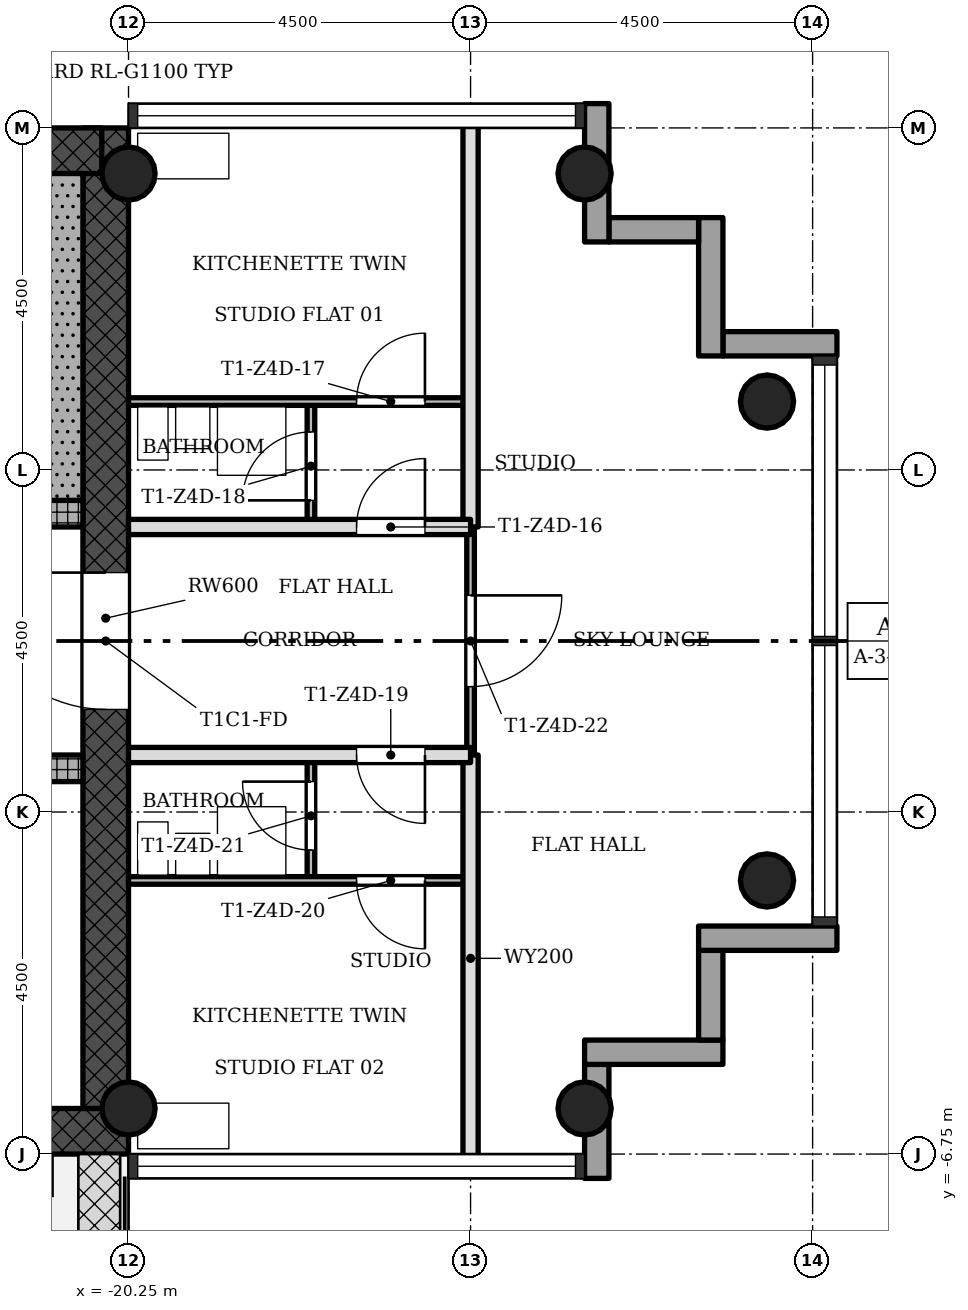
"""IFC4 building model, lengths in metres.
Left out: names, types, materials, properties, quantities, classifications, styles, units other than length and angle.
Written with IfcOpenShell. Run it as: python <this file> out.ifc"""

import sys

from ifc_helpers import new_model, si_unit, direction, frame, frame_2d, origin, origin_2d, place, context, subcontext, project, spatial, rectangle, hollow_circle, extrude, element, fill, save


model = new_model("IFC4")
c1 = context("Model", 3, precision=1e-05, world=origin(), true_north=direction((0.0, 1.0)))
c2 = subcontext(c1, "Body", "Model", "MODEL_VIEW")
j1 = project(units=[si_unit("LENGTHUNIT", "METRE"), si_unit("PLANEANGLEUNIT", "RADIAN")], contexts=[c1])
p1 = place(None, origin())
s1 = spatial("IfcSite", under=j1, at=p1, CompositionType="ELEMENT")
p2 = place(p1, origin())
s2 = spatial("IfcBuilding", under=s1, at=p2, CompositionType="ELEMENT")
p3 = place(p2, frame((0.0, 0.0, 199.4)))
s3 = spatial("IfcBuildingStorey", under=s2, at=p3, CompositionType="ELEMENT", Elevation=199.4)
p4 = place(p3, frame((-28.65, -6.45, 0.0), z_axis=(0.0, 0.0, 1.0), x_axis=(1.0, 0.0, 0.0)))
e1 = element("IfcWall", 1, at=p4, inside=s3, PredefinedType="SHEAR", context=c2, shape_type="SweptSolid", body=[
    extrude(rectangle(XDim=8.4, YDim=0.6, at=frame_2d((4.2, 0.0))), origin(), (0.0, 0.0, 1.0), 3.4),
])
p5 = place(p3, frame((-20.55, -6.15, 0.0), z_axis=(0.0, 0.0, 1.0), x_axis=(0.0, 1.0, 0.0)))
e2 = element("IfcWall", 2, at=p5, inside=s3, PredefinedType="SHEAR", context=c2, shape_type="SweptSolid", body=[
    extrude(rectangle(XDim=12.9, YDim=0.6, at=frame_2d((6.45, 0.0))), origin(), (0.0, 0.0, 1.0), 3.4),
])
p6 = place(p5, frame((5.25, 0.0, 0.0)))
e3 = element("IfcOpeningElement", 3, at=p6, cuts=e2, PredefinedType="OPENING", context=c2, shape_type="SweptSolid", body=[
    extrude(rectangle(XDim=1.8, YDim=2.1, at=frame_2d((0.9, 1.05))), frame((0.0, 0.31, 0.0), z_axis=(0.0, -1.0, 0.0), x_axis=(1.0, 0.0, 0.0)), (0.0, 0.0, 1.0), 0.62),
])
p7 = place(p3, frame((-20.602, 6.45, 0.0), z_axis=(0.0, 0.0, 1.0), x_axis=(-1.0, 0.0, 0.0)))
e4 = element("IfcWall", 4, at=p7, inside=s3, PredefinedType="SHEAR", context=c2, shape_type="SweptSolid", body=[
    extrude(rectangle(XDim=8.896, YDim=0.6, at=frame_2d((4.448, 0.0))), origin(), (0.0, 0.0, 1.0), 3.4),
])
p8 = place(p3, frame((-28.65, -1.675, 0.0), z_axis=(0.0, 0.0, 1.0), x_axis=(1.0, 0.0, 0.0)))
e5 = element("IfcWall", 5, at=p8, inside=s3, PredefinedType="SHEAR", context=c2, shape_type="SweptSolid", body=[
    extrude(rectangle(XDim=7.8, YDim=0.35, at=frame_2d((3.9, 0.0))), origin(), (0.0, 0.0, 1.0), 3.4),
])
p9 = place(p8, frame((1.15, 0.0, 0.0)))
e6 = element("IfcOpeningElement", 6, at=p9, cuts=e5, PredefinedType="OPENING", context=c2, shape_type="SweptSolid", body=[
    extrude(rectangle(XDim=1.1, YDim=2.1, at=frame_2d((0.55, 1.05))), frame((0.0, 0.185, 0.0), z_axis=(0.0, -1.0, 0.0), x_axis=(1.0, 0.0, 0.0)), (0.0, 0.0, 1.0), 0.37),
])
p10 = place(p8, frame((3.35, 0.0, 0.0)))
e7 = element("IfcOpeningElement", 7, at=p10, cuts=e5, PredefinedType="OPENING", context=c2, shape_type="SweptSolid", body=[
    extrude(rectangle(XDim=1.1, YDim=2.1, at=frame_2d((0.55, 1.05))), frame((0.0, 0.185, 0.0), z_axis=(0.0, -1.0, 0.0), x_axis=(1.0, 0.0, 0.0)), (0.0, 0.0, 1.0), 0.37),
])
p11 = place(p8, frame((5.55, 0.0, 0.0)))
e8 = element("IfcOpeningElement", 8, at=p11, cuts=e5, PredefinedType="OPENING", context=c2, shape_type="SweptSolid", body=[
    extrude(rectangle(XDim=1.1, YDim=2.1, at=frame_2d((0.55, 1.05))), frame((0.0, 0.185, 0.0), z_axis=(0.0, -1.0, 0.0), x_axis=(1.0, 0.0, 0.0)), (0.0, 0.0, 1.0), 0.37),
])
p12 = place(p3, frame((-28.65, 1.675, 0.0), z_axis=(0.0, 0.0, 1.0), x_axis=(1.0, 0.0, 0.0)))
e9 = element("IfcWall", 9, at=p12, inside=s3, PredefinedType="SHEAR", context=c2, shape_type="SweptSolid", body=[
    extrude(rectangle(XDim=7.8, YDim=0.35, at=frame_2d((3.9, 0.0))), origin(), (0.0, 0.0, 1.0), 3.4),
])
p13 = place(p12, frame((1.05, 0.0, 0.0)))
e10 = element("IfcOpeningElement", 10, at=p13, cuts=e9, PredefinedType="OPENING", context=c2, shape_type="SweptSolid", body=[
    extrude(rectangle(XDim=0.9, YDim=2.1, at=frame_2d((0.45, 1.05))), frame((0.0, 0.185, 0.0), z_axis=(0.0, -1.0, 0.0), x_axis=(1.0, 0.0, 0.0)), (0.0, 0.0, 1.0), 0.37),
])
for number, where, z_axis, x_axis in (
    (11, (-20.25, -6.15, 0.0), (0.0, 0.0, 1.0), (1.0, 0.0, 0.0)),
    (12, (-20.25, 6.15, 0.0), (0.0, 0.0, 1.0), (1.0, 0.0, 0.0)),
    (13, (-14.25, -6.15, 0.0), (0.0, 0.0, 1.0), (1.0, 0.0, 0.0)),
    (14, (-14.25, 6.15, 0.0), (0.0, 0.0, 1.0), (1.0, 0.0, 0.0)),
    (15, (-11.85, -3.15, 0.0), (0.0, 0.0, 1.0), (1.0, 0.0, 0.0)),
    (16, (-11.85, 3.15, 0.0), (0.0, 0.0, 1.0), (1.0, 0.0, 0.0)),
):
    element("IfcColumn", number, at=place(p3, frame(where, z_axis=z_axis, x_axis=x_axis)), inside=s3, PredefinedType="COLUMN", context=c2, shape_type="SweptSolid", body=[
        extrude(hollow_circle(Radius=0.35, WallThickness=0.025, at=origin_2d()), origin(), (0.0, 0.0, 1.0), 3.4),
    ])
p14 = place(p3, frame((-14.09, -7.07, -0.3), z_axis=(0.0, 0.0, 1.0), x_axis=(0.0, 1.0, 0.0)))
e17 = element("IfcWall", 17, at=p14, inside=s3, PredefinedType="STANDARD", context=c2, shape_type="SweptSolid", body=[
    extrude(rectangle(XDim=1.5, YDim=0.32, at=frame_2d((0.75, 0.0))), origin(), (0.0, 0.0, 1.0), 3.4),
])
p15 = place(p3, frame((-14.25, -5.41, -0.3), z_axis=(0.0, 0.0, 1.0), x_axis=(1.0, 0.0, 0.0)))
e18 = element("IfcWall", 18, at=p15, inside=s3, PredefinedType="STANDARD", context=c2, shape_type="SweptSolid", body=[
    extrude(rectangle(XDim=1.82, YDim=0.32, at=frame_2d((0.91, 0.0))), origin(), (0.0, 0.0, 1.0), 3.4),
])
p16 = place(p3, frame((-12.59, -5.25, -0.3), z_axis=(0.0, 0.0, 1.0), x_axis=(0.0, 1.0, 0.0)))
e19 = element("IfcWall", 19, at=p16, inside=s3, PredefinedType="STANDARD", context=c2, shape_type="SweptSolid", body=[
    extrude(rectangle(XDim=1.18, YDim=0.32, at=frame_2d((0.59, 0.0))), origin(), (0.0, 0.0, 1.0), 3.4),
])
p17 = place(p3, frame((-12.75, -3.91, -0.3), z_axis=(0.0, 0.0, 1.0), x_axis=(1.0, 0.0, 0.0)))
e20 = element("IfcWall", 20, at=p17, inside=s3, PredefinedType="STANDARD", context=c2, shape_type="SweptSolid", body=[
    extrude(rectangle(XDim=1.82, YDim=0.32, at=frame_2d((0.91, 0.0))), origin(), (0.0, 0.0, 1.0), 3.4),
])
p18 = place(p3, frame((-10.93, 3.91, -0.3), z_axis=(0.0, 0.0, 1.0), x_axis=(-1.0, 0.0, 0.0)))
e21 = element("IfcWall", 21, at=p18, inside=s3, PredefinedType="STANDARD", context=c2, shape_type="SweptSolid", body=[
    extrude(rectangle(XDim=1.5, YDim=0.32, at=frame_2d((0.75, 0.0))), origin(), (0.0, 0.0, 1.0), 3.4),
])
p19 = place(p3, frame((-12.59, 3.75, -0.3), z_axis=(0.0, 0.0, 1.0), x_axis=(0.0, 1.0, 0.0)))
e22 = element("IfcWall", 22, at=p19, inside=s3, PredefinedType="STANDARD", context=c2, shape_type="SweptSolid", body=[
    extrude(rectangle(XDim=1.82, YDim=0.32, at=frame_2d((0.91, 0.0))), origin(), (0.0, 0.0, 1.0), 3.4),
])
p20 = place(p3, frame((-12.75, 5.41, -0.3), z_axis=(0.0, 0.0, 1.0), x_axis=(-1.0, 0.0, 0.0)))
e23 = element("IfcWall", 23, at=p20, inside=s3, PredefinedType="STANDARD", context=c2, shape_type="SweptSolid", body=[
    extrude(rectangle(XDim=1.18, YDim=0.32, at=frame_2d((0.59, 0.0))), origin(), (0.0, 0.0, 1.0), 3.4),
])
p21 = place(p3, frame((-14.09, 5.25, -0.3), z_axis=(0.0, 0.0, 1.0), x_axis=(0.0, 1.0, 0.0)))
e24 = element("IfcWall", 24, at=p21, inside=s3, PredefinedType="STANDARD", context=c2, shape_type="SweptSolid", body=[
    extrude(rectangle(XDim=1.82, YDim=0.32, at=frame_2d((0.91, 0.0))), origin(), (0.0, 0.0, 1.0), 3.4),
])
p22 = place(p3, frame((-17.85, -3.15, 0.0), z_axis=(0.0, 0.0, 1.0), x_axis=(0.0, 1.0, 0.0)))
e25 = element("IfcWall", 25, at=p22, inside=s3, PredefinedType="PARTITIONING", context=c2, shape_type="SweptSolid", body=[
    extrude(rectangle(XDim=1.65, YDim=0.1, at=frame_2d((0.825, 0.0))), origin(), (0.0, 0.0, 1.0), 3.0),
])
p23 = place(p22, frame((0.4, 0.0, 0.0)))
e26 = element("IfcOpeningElement", 26, at=p23, cuts=e25, PredefinedType="OPENING", context=c2, shape_type="SweptSolid", body=[
    extrude(rectangle(XDim=0.9, YDim=2.1, at=frame_2d((0.45, 1.05))), frame((0.0, 0.06, 0.0), z_axis=(0.0, -1.0, 0.0), x_axis=(1.0, 0.0, 0.0)), (0.0, 0.0, 1.0), 0.12),
])
p24 = place(p3, frame((-17.85, 1.5, 0.0), z_axis=(0.0, 0.0, 1.0), x_axis=(0.0, 1.0, 0.0)))
e27 = element("IfcWall", 27, at=p24, inside=s3, PredefinedType="PARTITIONING", context=c2, shape_type="SweptSolid", body=[
    extrude(rectangle(XDim=1.65, YDim=0.1, at=frame_2d((0.825, 0.0))), origin(), (0.0, 0.0, 1.0), 3.0),
])
p25 = place(p24, frame((0.35, 0.0, 0.0)))
e28 = element("IfcOpeningElement", 28, at=p25, cuts=e27, PredefinedType="OPENING", context=c2, shape_type="SweptSolid", body=[
    extrude(rectangle(XDim=0.9, YDim=2.1, at=frame_2d((0.45, 1.05))), frame((0.0, 0.06, 0.0), z_axis=(0.0, -1.0, 0.0), x_axis=(1.0, 0.0, 0.0)), (0.0, 0.0, 1.0), 0.12),
])
p26 = place(p3, frame((-15.75, -1.5, 0.0), z_axis=(0.0, 0.0, 1.0), x_axis=(0.0, 1.0, 0.0)))
e29 = element("IfcWall", 29, at=p26, inside=s3, PredefinedType="PARTITIONING", context=c2, shape_type="SweptSolid", body=[
    extrude(rectangle(XDim=3.0, YDim=0.1, at=frame_2d((1.5, 0.0))), origin(), (0.0, 0.0, 1.0), 3.0),
])
p27 = place(p26, frame((0.9, 0.0, 0.0)))
e30 = element("IfcOpeningElement", 30, at=p27, cuts=e29, PredefinedType="OPENING", context=c2, shape_type="SweptSolid", body=[
    extrude(rectangle(XDim=1.2, YDim=2.1, at=frame_2d((0.6, 1.05))), frame((0.0, 0.06, 0.0), z_axis=(0.0, -1.0, 0.0), x_axis=(1.0, 0.0, 0.0)), (0.0, 0.0, 1.0), 0.12),
])
for number, where, z_axis, x_axis in (
    (31, (-15.75, -6.85, 0.0), (0.0, 0.0, 1.0), (0.0, 1.0, 0.0)),
    (32, (-15.75, 1.5, 0.0), (0.0, 0.0, 1.0), (0.0, 1.0, 0.0)),
):
    element("IfcWall", number, at=place(p3, frame(where, z_axis=z_axis, x_axis=x_axis)), inside=s3, PredefinedType="SOLIDWALL", context=c2, shape_type="SweptSolid", body=[
        extrude(rectangle(XDim=5.35, YDim=0.2, at=frame_2d((2.675, 0.0))), origin(), (0.0, 0.0, 1.0), 3.0),
    ])
p28 = place(p3, frame((-20.25, -3.15, 0.0), z_axis=(0.0, 0.0, 1.0), x_axis=(1.0, 0.0, 0.0)))
e33 = element("IfcWall", 33, at=p28, inside=s3, PredefinedType="PARTITIONING", context=c2, shape_type="SweptSolid", body=[
    extrude(rectangle(XDim=4.5, YDim=0.1, at=frame_2d((2.25, 0.0))), origin(), (0.0, 0.0, 1.0), 3.0),
])
p29 = place(p28, frame((3.0, 0.0, 0.0)))
e34 = element("IfcOpeningElement", 34, at=p29, cuts=e33, PredefinedType="OPENING", context=c2, shape_type="SweptSolid", body=[
    extrude(rectangle(XDim=0.9, YDim=2.1, at=frame_2d((0.45, 1.05))), frame((0.0, 0.06, 0.0), z_axis=(0.0, -1.0, 0.0), x_axis=(1.0, 0.0, 0.0)), (0.0, 0.0, 1.0), 0.12),
])
p30 = place(p3, frame((-20.25, -1.5, 0.0), z_axis=(0.0, 0.0, 1.0), x_axis=(1.0, 0.0, 0.0)))
e35 = element("IfcWall", 35, at=p30, inside=s3, PredefinedType="SOLIDWALL", context=c2, shape_type="SweptSolid", body=[
    extrude(rectangle(XDim=4.5, YDim=0.2, at=frame_2d((2.25, 0.0))), origin(), (0.0, 0.0, 1.0), 3.0),
])
p31 = place(p30, frame((3.0, 0.0, 0.0)))
e36 = element("IfcOpeningElement", 36, at=p31, cuts=e35, PredefinedType="OPENING", context=c2, shape_type="SweptSolid", body=[
    extrude(rectangle(XDim=0.9, YDim=2.1, at=frame_2d((0.45, 1.05))), frame((0.0, 0.11, 0.0), z_axis=(0.0, -1.0, 0.0), x_axis=(1.0, 0.0, 0.0)), (0.0, 0.0, 1.0), 0.22),
])
p32 = place(p3, frame((-20.25, 1.5, 0.0), z_axis=(0.0, 0.0, 1.0), x_axis=(1.0, 0.0, 0.0)))
e37 = element("IfcWall", 37, at=p32, inside=s3, PredefinedType="SOLIDWALL", context=c2, shape_type="SweptSolid", body=[
    extrude(rectangle(XDim=4.5, YDim=0.2, at=frame_2d((2.25, 0.0))), origin(), (0.0, 0.0, 1.0), 3.0),
])
p33 = place(p32, frame((3.0, 0.0, 0.0)))
e38 = element("IfcOpeningElement", 38, at=p33, cuts=e37, PredefinedType="OPENING", context=c2, shape_type="SweptSolid", body=[
    extrude(rectangle(XDim=0.9, YDim=2.1, at=frame_2d((0.45, 1.05))), frame((0.0, 0.11, 0.0), z_axis=(0.0, -1.0, 0.0), x_axis=(1.0, 0.0, 0.0)), (0.0, 0.0, 1.0), 0.22),
])
p34 = place(p3, frame((-20.25, 3.15, 0.0), z_axis=(0.0, 0.0, 1.0), x_axis=(1.0, 0.0, 0.0)))
e39 = element("IfcWall", 39, at=p34, inside=s3, PredefinedType="PARTITIONING", context=c2, shape_type="SweptSolid", body=[
    extrude(rectangle(XDim=4.5, YDim=0.1, at=frame_2d((2.25, 0.0))), origin(), (0.0, 0.0, 1.0), 3.0),
])
p35 = place(p34, frame((3.0, 0.0, 0.0)))
e40 = element("IfcOpeningElement", 40, at=p35, cuts=e39, PredefinedType="OPENING", context=c2, shape_type="SweptSolid", body=[
    extrude(rectangle(XDim=0.9, YDim=2.1, at=frame_2d((0.45, 1.05))), frame((0.0, 0.06, 0.0), z_axis=(0.0, -1.0, 0.0), x_axis=(1.0, 0.0, 0.0)), (0.0, 0.0, 1.0), 0.12),
])
p36 = place(p3, frame((-21.15, 1.85, 0.0), z_axis=(0.0, 0.0, 1.0), x_axis=(0.0, 1.0, 0.0)))
e41 = element("IfcWall", 41, at=p36, inside=s3, PredefinedType="SHEAR", context=c2, shape_type="SweptSolid", body=[
    extrude(rectangle(XDim=4.3, YDim=0.6, at=frame_2d((2.15, 0.0))), origin(), (0.0, 0.0, 1.0), 3.4),
])
p37 = place(p33, origin())
e42 = element("IfcDoor", 42, at=p37, inside=s3, OperationType="SINGLE_SWING_LEFT", PredefinedType="DOOR", context=c2, shape_type="SweptSolid", body=[
    extrude(rectangle(XDim=0.9, YDim=2.1, at=frame_2d((0.45, 1.05))), frame((0.0, 0.025, 0.0), z_axis=(0.0, -1.0, 0.0), x_axis=(1.0, 0.0, 0.0)), (0.0, 0.0, 1.0), 0.05),
])
fill(e38, e42)
p38 = place(p35, origin())
e43 = element("IfcDoor", 43, at=p38, inside=s3, OperationType="SINGLE_SWING_LEFT", PredefinedType="DOOR", context=c2, shape_type="SweptSolid", body=[
    extrude(rectangle(XDim=0.9, YDim=2.1, at=frame_2d((0.45, 1.05))), frame((0.0, 0.025, 0.0), z_axis=(0.0, -1.0, 0.0), x_axis=(1.0, 0.0, 0.0)), (0.0, 0.0, 1.0), 0.05),
])
fill(e40, e43)
p39 = place(p25, origin())
e44 = element("IfcDoor", 44, at=p39, inside=s3, OperationType="SINGLE_SWING_RIGHT", PredefinedType="DOOR", context=c2, shape_type="SweptSolid", body=[
    extrude(rectangle(XDim=0.9, YDim=2.1, at=frame_2d((0.45, 1.05))), frame((0.0, 0.025, 0.0), z_axis=(0.0, -1.0, 0.0), x_axis=(1.0, 0.0, 0.0)), (0.0, 0.0, 1.0), 0.05),
])
fill(e28, e44)
p40 = place(p31, origin())
e45 = element("IfcDoor", 45, at=p40, inside=s3, OperationType="SINGLE_SWING_RIGHT", PredefinedType="DOOR", context=c2, shape_type="SweptSolid", body=[
    extrude(rectangle(XDim=0.9, YDim=2.1, at=frame_2d((0.45, 1.05))), frame((0.0, 0.025, 0.0), z_axis=(0.0, -1.0, 0.0), x_axis=(1.0, 0.0, 0.0)), (0.0, 0.0, 1.0), 0.05),
])
fill(e36, e45)
p41 = place(p29, origin())
e46 = element("IfcDoor", 46, at=p41, inside=s3, OperationType="SINGLE_SWING_RIGHT", PredefinedType="DOOR", context=c2, shape_type="SweptSolid", body=[
    extrude(rectangle(XDim=0.9, YDim=2.1, at=frame_2d((0.45, 1.05))), frame((0.0, 0.025, 0.0), z_axis=(0.0, -1.0, 0.0), x_axis=(1.0, 0.0, 0.0)), (0.0, 0.0, 1.0), 0.05),
])
fill(e34, e46)
p42 = place(p23, origin())
e47 = element("IfcDoor", 47, at=p42, inside=s3, OperationType="SINGLE_SWING_LEFT", PredefinedType="DOOR", context=c2, shape_type="SweptSolid", body=[
    extrude(rectangle(XDim=0.9, YDim=2.1, at=frame_2d((0.45, 1.05))), frame((0.0, 0.025, 0.0), z_axis=(0.0, -1.0, 0.0), x_axis=(1.0, 0.0, 0.0)), (0.0, 0.0, 1.0), 0.05),
])
fill(e26, e47)
p43 = place(p27, origin())
e48 = element("IfcDoor", 48, at=p43, inside=s3, OperationType="SINGLE_SWING_RIGHT", PredefinedType="DOOR", context=c2, shape_type="SweptSolid", body=[
    extrude(rectangle(XDim=1.2, YDim=2.1, at=frame_2d((0.6, 1.05))), frame((0.0, 0.025, 0.0), z_axis=(0.0, -1.0, 0.0), x_axis=(1.0, 0.0, 0.0)), (0.0, 0.0, 1.0), 0.05),
])
fill(e30, e48)
p44 = place(p6, origin())
e49 = element("IfcDoor", 49, at=p44, inside=s3, OperationType="SINGLE_SWING_LEFT", PredefinedType="DOOR", context=c2, shape_type="SweptSolid", body=[
    extrude(rectangle(XDim=1.8, YDim=2.1, at=frame_2d((0.9, 1.05))), frame((0.0, 0.025, 0.0), z_axis=(0.0, -1.0, 0.0), x_axis=(1.0, 0.0, 0.0)), (0.0, 0.0, 1.0), 0.05),
])
fill(e3, e49)
save(model, sys.argv[1])
